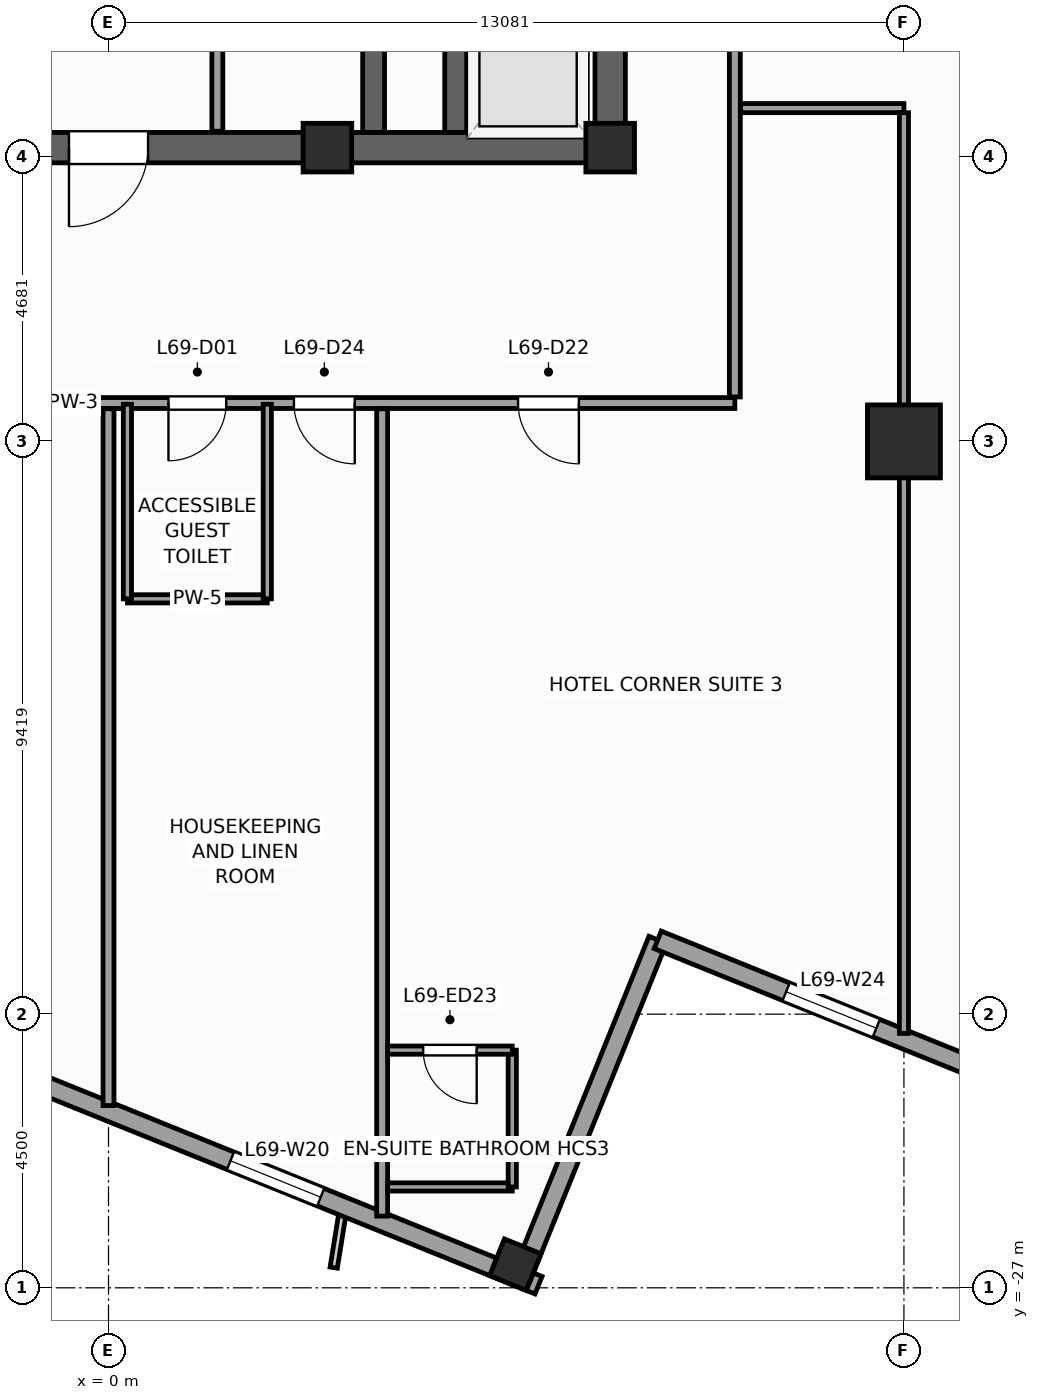
"""IFC4 building model, lengths in metres.
Left out: names, types, materials, properties, quantities, classifications, styles, units other than length and angle.
Written with IfcOpenShell. Run it as: python <this file> out.ifc"""

import sys

from ifc_helpers import new_model, si_unit, direction, frame, frame_2d, origin, origin_2d, place, context, subcontext, project, spatial, rectangle, extrude, source, transform, mapped, element, fill, save


model = new_model("IFC4")
c1 = context("Model", 3, precision=1e-05, world=origin(), true_north=direction((0.0, 1.0)))
c2 = subcontext(c1, "Body", "Model", "MODEL_VIEW")
j1 = project(units=[si_unit("LENGTHUNIT", "METRE"), si_unit("PLANEANGLEUNIT", "RADIAN")], contexts=[c1])
p1 = place(None, origin())
s1 = spatial("IfcSite", under=j1, at=p1, CompositionType="ELEMENT")
p2 = place(p1, origin())
s2 = spatial("IfcBuilding", under=s1, at=p2, CompositionType="ELEMENT")
p3 = place(p2, frame((0.0, 0.0, 283.2)))
s3 = spatial("IfcBuildingStorey", under=s2, at=p3, CompositionType="ELEMENT", Elevation=283.2)
p4 = place(p3, frame((-8.5, -8.25, 0.0), z_axis=(0.0, 0.0, 1.0), x_axis=(1.0, 0.0, 0.0)))
e1 = element("IfcWall", 1, at=p4, inside=s3, PredefinedType="SHEAR", context=c2, shape_type="SweptSolid", body=[
    extrude(rectangle(XDim=17.0, YDim=0.5, at=frame_2d((8.5, 0.0))), origin(), (0.0, 0.0, 1.0), 3.6),
])
p5 = place(p4, frame((7.85, 0.0, 0.0)))
e2 = element("IfcOpeningElement", 2, at=p5, cuts=e1, PredefinedType="OPENING", context=c2, shape_type="SweptSolid", body=[
    extrude(rectangle(XDim=1.3, YDim=2.2, at=frame_2d((0.65, 1.1))), frame((0.0, 0.26, 0.0), z_axis=(0.0, -1.0, 0.0), x_axis=(1.0, 0.0, 0.0)), (0.0, 0.0, 1.0), 0.52),
])
p6 = place(p3, frame((8.25, -8.0, 0.0), z_axis=(0.0, 0.0, 1.0), x_axis=(0.0, 1.0, 0.0)))
e3 = element("IfcWall", 3, at=p6, inside=s3, PredefinedType="SHEAR", context=c2, shape_type="SweptSolid", body=[
    extrude(rectangle(XDim=16.0, YDim=0.5, at=frame_2d((8.0, 0.0))), origin(), (0.0, 0.0, 1.0), 3.6),
])
p7 = place(p6, frame((4.69, 0.0, 0.0)))
e4 = element("IfcOpeningElement", 4, at=p7, cuts=e3, PredefinedType="OPENING", context=c2, shape_type="SweptSolid", body=[
    extrude(rectangle(XDim=1.3, YDim=2.2, at=frame_2d((0.65, 1.1))), frame((0.0, 0.26, 0.0), z_axis=(0.0, -1.0, 0.0), x_axis=(1.0, 0.0, 0.0)), (0.0, 0.0, 1.0), 0.52),
])
p8 = place(p3, frame((4.36, -8.0, 0.0), z_axis=(0.0, 0.0, 1.0), x_axis=(0.0, 1.0, 0.0)))
e5 = element("IfcWall", 5, at=p8, inside=s3, PredefinedType="SHEAR", context=c2, shape_type="SweptSolid", body=[
    extrude(rectangle(XDim=16.0, YDim=0.36, at=frame_2d((8.0, 0.0))), origin(), (0.0, 0.0, 1.0), 3.6),
])
p9 = place(p3, frame((5.71, -8.0, 0.0), z_axis=(0.0, 0.0, 1.0), x_axis=(0.0, 1.0, 0.0)))
e6 = element("IfcWall", 6, at=p9, inside=s3, PredefinedType="SHEAR", context=c2, shape_type="SweptSolid", body=[
    extrude(rectangle(XDim=2.54, YDim=0.36, at=frame_2d((1.27, 0.0))), origin(), (0.0, 0.0, 1.0), 3.6),
])
m1 = source(origin(), c2, "Body", "SweptSolid", [
    extrude(rectangle(XDim=0.8, YDim=0.8, at=origin_2d()), origin(), (0.0, 0.0, 1.0), 3.6),
])
for number, where, z_axis, x_axis in (
    (7, (8.25, -8.25, 0.0), (0.0, 0.0, 1.0), (1.0, 0.0, 0.0)),
    (8, (3.6, -8.25, 0.0), (0.0, 0.0, 1.0), (1.0, 0.0, 0.0)),
):
    element("IfcColumn", number, at=place(p3, frame(where, z_axis=z_axis, x_axis=x_axis)), inside=s3, PredefinedType="PILASTER", context=c2, shape_type="MappedRepresentation", body=[
        mapped(m1, transform((0.0, 0.0, 0.0), scale=1.0)),
    ])
m2 = source(origin(), c2, "Body", "SweptSolid", [
    extrude(rectangle(XDim=1.2, YDim=1.2, at=origin_2d()), origin(), (0.0, 0.0, 1.0), 3.6),
])
p10 = place(p3, frame((13.081, -13.081, 0.0), z_axis=(0.0, 0.0, 1.0), x_axis=(1.0, 0.0, 0.0)))
e9 = element("IfcColumn", 9, at=p10, inside=s3, PredefinedType="COLUMN", context=c2, shape_type="MappedRepresentation", body=[
    mapped(m2, transform((0.0, 0.0, 0.0), scale=1.0)),
])
m3 = source(origin(), c2, "Body", "SweptSolid", [
    extrude(rectangle(XDim=0.65, YDim=0.65, at=origin_2d()), origin(), (0.0, 0.0, 1.0), 3.6),
])
p11 = place(p3, frame((6.69, -26.62, 0.0), z_axis=(0.0, 0.0, 1.0), x_axis=(0.374606593416, 0.927183854567, 0.0)))
e10 = element("IfcColumn", 10, at=p11, inside=s3, PredefinedType="COLUMN", context=c2, shape_type="MappedRepresentation", body=[
    mapped(m3, transform((0.0, 0.0, 0.0), scale=1.0)),
])
p12 = place(p3, frame((-23.813, -14.479, 0.0), z_axis=(0.0, 0.0, 1.0), x_axis=(0.927182657188, -0.374609557019, 0.0)))
e11 = element("IfcWall", 11, at=p12, inside=s3, PredefinedType="STANDARD", context=c2, shape_type="SweptSolid", body=[
    extrude(rectangle(XDim=33.31, YDim=0.31, at=frame_2d((16.655, 0.0))), origin(), (0.0, 0.0, 1.0), 2.75),
])
p13 = place(p12, frame((3.197, 0.0, 0.47)))
e12 = element("IfcOpeningElement", 12, at=p13, cuts=e11, PredefinedType="OPENING", context=c2, shape_type="SweptSolid", body=[
    extrude(rectangle(XDim=1.6, YDim=2.1, at=frame_2d((0.8, 1.05))), frame((0.0, 0.165, 0.0), z_axis=(0.0, -1.0, 0.0), x_axis=(1.0, 0.0, 0.0)), (0.0, 0.0, 1.0), 0.33),
])
p14 = place(p12, frame((8.86, 0.0, 0.47)))
e13 = element("IfcOpeningElement", 13, at=p14, cuts=e11, PredefinedType="OPENING", context=c2, shape_type="SweptSolid", body=[
    extrude(rectangle(XDim=1.6, YDim=2.1, at=frame_2d((0.8, 1.05))), frame((0.0, 0.165, 0.0), z_axis=(0.0, -1.0, 0.0), x_axis=(1.0, 0.0, 0.0)), (0.0, 0.0, 1.0), 0.33),
])
p15 = place(p12, frame((14.439, 0.0, 0.47)))
e14 = element("IfcOpeningElement", 14, at=p15, cuts=e11, PredefinedType="OPENING", context=c2, shape_type="SweptSolid", body=[
    extrude(rectangle(XDim=1.6, YDim=2.1, at=frame_2d((0.8, 1.05))), frame((0.0, 0.165, 0.0), z_axis=(0.0, -1.0, 0.0), x_axis=(1.0, 0.0, 0.0)), (0.0, 0.0, 1.0), 0.33),
])
p16 = place(p12, frame((21.851, 0.0, 0.47)))
e15 = element("IfcOpeningElement", 15, at=p16, cuts=e11, PredefinedType="OPENING", context=c2, shape_type="SweptSolid", body=[
    extrude(rectangle(XDim=1.6, YDim=2.1, at=frame_2d((0.8, 1.05))), frame((0.0, 0.165, 0.0), z_axis=(0.0, -1.0, 0.0), x_axis=(1.0, 0.0, 0.0)), (0.0, 0.0, 1.0), 0.33),
])
p17 = place(p12, frame((27.847, 0.0, 0.47)))
e16 = element("IfcOpeningElement", 16, at=p17, cuts=e11, PredefinedType="OPENING", context=c2, shape_type="SweptSolid", body=[
    extrude(rectangle(XDim=1.6, YDim=2.1, at=frame_2d((0.8, 1.05))), frame((0.0, 0.165, 0.0), z_axis=(0.0, -1.0, 0.0), x_axis=(1.0, 0.0, 0.0)), (0.0, 0.0, 1.0), 0.33),
])
p18 = place(p3, frame((6.784, -26.841, 0.0), z_axis=(0.0, 0.0, 1.0), x_axis=(0.374636620962, 0.927171722085, 0.0)))
e17 = element("IfcWall", 17, at=p18, inside=s3, PredefinedType="STANDARD", context=c2, shape_type="SweptSolid", body=[
    extrude(rectangle(XDim=6.0, YDim=0.31, at=frame_2d((3.0, 0.0))), origin(), (0.0, 0.0, 1.0), 2.65),
])
p19 = place(p3, frame((9.032, -21.278, 0.0), z_axis=(0.0, 0.0, 1.0), x_axis=(0.927185411764, -0.374602739196, 0.0)))
e18 = element("IfcWall", 18, at=p19, inside=s3, PredefinedType="STANDARD", context=c2, shape_type="SweptSolid", body=[
    extrude(rectangle(XDim=6.155, YDim=0.31, at=frame_2d((3.078, 0.0))), origin(), (0.0, 0.0, 1.0), 3.35),
])
p20 = place(p19, frame((2.278, 0.0, 0.47)))
e19 = element("IfcOpeningElement", 19, at=p20, cuts=e18, PredefinedType="OPENING", context=c2, shape_type="SweptSolid", body=[
    extrude(rectangle(XDim=1.6, YDim=2.1, at=frame_2d((0.8, 1.05))), frame((0.0, 0.165, 0.0), z_axis=(0.0, -1.0, 0.0), x_axis=(1.0, 0.0, 0.0)), (0.0, 0.0, 1.0), 0.33),
])
p21 = place(p3, frame((1.79, -7.98, 0.0), z_axis=(0.0, 0.0, 1.0), x_axis=(0.0, 1.0, 0.0)))
e20 = element("IfcWall", 20, at=p21, inside=s3, PredefinedType="PARTITIONING", context=c2, shape_type="SweptSolid", body=[
    extrude(rectangle(XDim=12.38, YDim=0.18, at=frame_2d((6.19, 0.0))), origin(), (0.0, 0.0, 1.0), 3.35),
])
p22 = place(p21, frame((8.8, 0.0, 0.0)))
e21 = element("IfcOpeningElement", 21, at=p22, cuts=e20, PredefinedType="OPENING", context=c2, shape_type="SweptSolid", body=[
    extrude(rectangle(XDim=1.1, YDim=2.2, at=frame_2d((0.55, 1.1))), frame((0.0, 0.1, 0.0), z_axis=(0.0, -1.0, 0.0), x_axis=(1.0, 0.0, 0.0)), (0.0, 0.0, 1.0), 0.2),
])
p23 = place(p21, frame((10.86, 0.0, 0.0)))
e22 = element("IfcOpeningElement", 22, at=p23, cuts=e20, PredefinedType="OPENING", context=c2, shape_type="SweptSolid", body=[
    extrude(rectangle(XDim=1.1, YDim=2.2, at=frame_2d((0.55, 1.1))), frame((0.0, 0.1, 0.0), z_axis=(0.0, -1.0, 0.0), x_axis=(1.0, 0.0, 0.0)), (0.0, 0.0, 1.0), 0.2),
])
p24 = place(p21, frame((3.5, 0.0, 0.0)))
e23 = element("IfcOpeningElement", 23, at=p24, cuts=e20, PredefinedType="OPENING", context=c2, shape_type="SweptSolid", body=[
    extrude(rectangle(XDim=1.15, YDim=2.25, at=frame_2d((0.575, 1.125))), frame((0.0, 0.1, 0.0), z_axis=(0.0, -1.0, 0.0), x_axis=(1.0, 0.0, 0.0)), (0.0, 0.0, 1.0), 0.2),
])
p25 = place(p3, frame((-11.45, -12.45, 0.0), z_axis=(0.0, 0.0, 1.0), x_axis=(1.0, 0.0, 0.0)))
e24 = element("IfcWall", 24, at=p25, inside=s3, PredefinedType="PARTITIONING", context=c2, shape_type="SweptSolid", body=[
    extrude(rectangle(XDim=21.75, YDim=0.18, at=frame_2d((10.875, 0.0))), origin(), (0.0, 0.0, 1.0), 3.35),
])
p26 = place(p25, frame((12.436, 0.0, 0.0)))
e25 = element("IfcOpeningElement", 25, at=p26, cuts=e24, PredefinedType="OPENING", context=c2, shape_type="SweptSolid", body=[
    extrude(rectangle(XDim=0.95, YDim=2.1, at=frame_2d((0.475, 1.05))), frame((0.0, 0.1, 0.0), z_axis=(0.0, -1.0, 0.0), x_axis=(1.0, 0.0, 0.0)), (0.0, 0.0, 1.0), 0.2),
])
p27 = place(p25, frame((18.186, 0.0, 0.0)))
e26 = element("IfcOpeningElement", 26, at=p27, cuts=e24, PredefinedType="OPENING", context=c2, shape_type="SweptSolid", body=[
    extrude(rectangle(XDim=1.0, YDim=2.15, at=frame_2d((0.5, 1.075))), frame((0.0, 0.1, 0.0), z_axis=(0.0, -1.0, 0.0), x_axis=(1.0, 0.0, 0.0)), (0.0, 0.0, 1.0), 0.2),
])
p28 = place(p25, frame((14.5, 0.0, 0.0)))
e27 = element("IfcOpeningElement", 27, at=p28, cuts=e24, PredefinedType="OPENING", context=c2, shape_type="SweptSolid", body=[
    extrude(rectangle(XDim=1.0, YDim=2.15, at=frame_2d((0.5, 1.075))), frame((0.0, 0.1, 0.0), z_axis=(0.0, -1.0, 0.0), x_axis=(1.0, 0.0, 0.0)), (0.0, 0.0, 1.0), 0.2),
])
p29 = place(p25, frame((8.7, 0.0, 0.0)))
e28 = element("IfcOpeningElement", 28, at=p29, cuts=e24, PredefinedType="OPENING", context=c2, shape_type="SweptSolid", body=[
    extrude(rectangle(XDim=1.0, YDim=2.15, at=frame_2d((0.5, 1.075))), frame((0.0, 0.1, 0.0), z_axis=(0.0, -1.0, 0.0), x_axis=(1.0, 0.0, 0.0)), (0.0, 0.0, 1.0), 0.2),
])
p30 = place(p25, frame((3.139, 0.0, 0.0)))
e29 = element("IfcOpeningElement", 29, at=p30, cuts=e24, PredefinedType="OPENING", context=c2, shape_type="SweptSolid", body=[
    extrude(rectangle(XDim=1.0, YDim=2.15, at=frame_2d((0.5, 1.075))), frame((0.0, 0.1, 0.0), z_axis=(0.0, -1.0, 0.0), x_axis=(1.0, 0.0, 0.0)), (0.0, 0.0, 1.0), 0.2),
])
p31 = place(p3, frame((10.3, -12.35, 0.0), z_axis=(0.0, 0.0, 1.0), x_axis=(0.0, 1.0, 0.0)))
e30 = element("IfcWall", 30, at=p31, inside=s3, PredefinedType="PARTITIONING", context=c2, shape_type="SweptSolid", body=[
    extrude(rectangle(XDim=23.7, YDim=0.18, at=frame_2d((11.85, 0.0))), origin(), (0.0, 0.0, 1.0), 3.35),
])
p32 = place(p31, frame((17.65, 0.0, 0.0)))
e31 = element("IfcOpeningElement", 31, at=p32, cuts=e30, PredefinedType="OPENING", context=c2, shape_type="SweptSolid", body=[
    extrude(rectangle(XDim=1.0, YDim=2.15, at=frame_2d((0.5, 1.075))), frame((0.0, 0.1, 0.0), z_axis=(0.0, -1.0, 0.0), x_axis=(1.0, 0.0, 0.0)), (0.0, 0.0, 1.0), 0.2),
])
p33 = place(p31, frame((13.85, 0.0, 0.0)))
e32 = element("IfcOpeningElement", 32, at=p33, cuts=e30, PredefinedType="OPENING", context=c2, shape_type="SweptSolid", body=[
    extrude(rectangle(XDim=1.0, YDim=2.15, at=frame_2d((0.5, 1.075))), frame((0.0, 0.1, 0.0), z_axis=(0.0, -1.0, 0.0), x_axis=(1.0, 0.0, 0.0)), (0.0, 0.0, 1.0), 0.2),
])
p34 = place(p31, frame((9.85, 0.0, 0.0)))
e33 = element("IfcOpeningElement", 33, at=p34, cuts=e30, PredefinedType="OPENING", context=c2, shape_type="SweptSolid", body=[
    extrude(rectangle(XDim=1.0, YDim=2.15, at=frame_2d((0.5, 1.075))), frame((0.0, 0.1, 0.0), z_axis=(0.0, -1.0, 0.0), x_axis=(1.0, 0.0, 0.0)), (0.0, 0.0, 1.0), 0.2),
])
p35 = place(p31, frame((6.05, 0.0, 0.0)))
e34 = element("IfcOpeningElement", 34, at=p35, cuts=e30, PredefinedType="OPENING", context=c2, shape_type="SweptSolid", body=[
    extrude(rectangle(XDim=1.0, YDim=2.15, at=frame_2d((0.5, 1.075))), frame((0.0, 0.1, 0.0), z_axis=(0.0, -1.0, 0.0), x_axis=(1.0, 0.0, 0.0)), (0.0, 0.0, 1.0), 0.2),
])
p36 = place(p3, frame((4.5, -12.545, 0.0), z_axis=(0.0, 0.0, 1.0), x_axis=(0.0, -1.0, 0.0)))
e35 = element("IfcWall", 35, at=p36, inside=s3, PredefinedType="PARTITIONING", context=c2, shape_type="SweptSolid", body=[
    extrude(rectangle(XDim=13.276, YDim=0.18, at=frame_2d((6.638, 0.0))), origin(), (0.0, 0.0, 1.0), 3.35),
])
p37 = place(p3, frame((0.0, -12.545, 0.0), z_axis=(0.0, 0.0, 1.0), x_axis=(0.0, -1.0, 0.0)))
e36 = element("IfcWall", 36, at=p37, inside=s3, PredefinedType="PARTITIONING", context=c2, shape_type="SweptSolid", body=[
    extrude(rectangle(XDim=11.458, YDim=0.18, at=frame_2d((5.729, 0.0))), origin(), (0.0, 0.0, 1.0), 3.02),
])
p38 = place(p3, frame((10.395, -7.6, 0.0), z_axis=(0.0, 0.0, 1.0), x_axis=(1.0, 0.0, 0.0)))
e37 = element("IfcWall", 37, at=p38, inside=s3, PredefinedType="PARTITIONING", context=c2, shape_type="SweptSolid", body=[
    extrude(rectangle(XDim=2.686, YDim=0.15, at=frame_2d((1.343, 0.0))), origin(), (0.0, 0.0, 1.0), 3.35),
])
p39 = place(p3, frame((13.081, -7.675, 0.0), z_axis=(0.0, 0.0, 1.0), x_axis=(0.0, -1.0, 0.0)))
e38 = element("IfcWall", 38, at=p39, inside=s3, PredefinedType="PARTITIONING", context=c2, shape_type="SweptSolid", body=[
    extrude(rectangle(XDim=15.142, YDim=0.15, at=frame_2d((7.571, 0.0))), origin(), (0.0, 0.0, 1.0), 2.45),
])
p40 = place(p3, frame((0.311, -15.67, 0.0), z_axis=(0.0, 0.0, 1.0), x_axis=(1.0, 0.0, 0.0)))
e39 = element("IfcWall", 39, at=p40, inside=s3, PredefinedType="PARTITIONING", context=c2, shape_type="SweptSolid", body=[
    extrude(rectangle(XDim=2.3, YDim=0.135, at=frame_2d((1.15, 0.0))), origin(), (0.0, 0.0, 1.0), 3.35),
])
p41 = place(p3, frame((2.611, -15.67, 0.0), z_axis=(0.0, 0.0, 1.0), x_axis=(0.0, 1.0, 0.0)))
e40 = element("IfcWall", 40, at=p41, inside=s3, PredefinedType="PARTITIONING", context=c2, shape_type="SweptSolid", body=[
    extrude(rectangle(XDim=3.2, YDim=0.135, at=frame_2d((1.6, 0.0))), origin(), (0.0, 0.0, 1.0), 3.02),
])
p42 = place(p3, frame((0.311, -15.67, 0.0), z_axis=(0.0, 0.0, 1.0), x_axis=(0.0, 1.0, 0.0)))
e41 = element("IfcWall", 41, at=p42, inside=s3, PredefinedType="PARTITIONING", context=c2, shape_type="SweptSolid", body=[
    extrude(rectangle(XDim=3.2, YDim=0.135, at=frame_2d((1.6, 0.0))), origin(), (0.0, 0.0, 1.0), 3.35),
])
p43 = place(p3, frame((4.59, -25.342, 0.0), z_axis=(0.0, 0.0, 1.0), x_axis=(1.0, 0.0, 0.0)))
e42 = element("IfcWall", 42, at=p43, inside=s3, PredefinedType="PARTITIONING", context=c2, shape_type="SweptSolid", body=[
    extrude(rectangle(XDim=2.05, YDim=0.135, at=frame_2d((1.025, 0.0))), origin(), (0.0, 0.0, 1.0), 3.35),
])
p44 = place(p3, frame((6.64, -25.342, 0.0), z_axis=(0.0, 0.0, 1.0), x_axis=(0.0, 1.0, 0.0)))
e43 = element("IfcWall", 43, at=p44, inside=s3, PredefinedType="PARTITIONING", context=c2, shape_type="SweptSolid", body=[
    extrude(rectangle(XDim=2.25, YDim=0.135, at=frame_2d((1.125, 0.0))), origin(), (0.0, 0.0, 1.0), 3.35),
])
p45 = place(p3, frame((4.59, -23.092, 0.0), z_axis=(0.0, 0.0, 1.0), x_axis=(1.0, 0.0, 0.0)))
e44 = element("IfcWall", 44, at=p45, inside=s3, PredefinedType="PARTITIONING", context=c2, shape_type="SweptSolid", body=[
    extrude(rectangle(XDim=2.05, YDim=0.135, at=frame_2d((1.025, 0.0))), origin(), (0.0, 0.0, 1.0), 3.35),
])
p46 = place(p45, frame((0.585, 0.0, 0.0)))
e45 = element("IfcOpeningElement", 45, at=p46, cuts=e44, PredefinedType="OPENING", context=c2, shape_type="SweptSolid", body=[
    extrude(rectangle(XDim=0.88, YDim=2.1, at=frame_2d((0.44, 1.05))), frame((0.0, 0.078, 0.0), z_axis=(0.0, -1.0, 0.0), x_axis=(1.0, 0.0, 0.0)), (0.0, 0.0, 1.0), 0.155),
])
m4 = source(origin(), c2, "Body", "SweptSolid", [
    extrude(rectangle(XDim=1.6, YDim=2.1, at=frame_2d((0.8, 1.05))), frame((0.0, 0.03, 0.0), z_axis=(0.0, -1.0, 0.0), x_axis=(1.0, 0.0, 0.0)), (0.0, 0.0, 1.0), 0.06),
])
p47 = place(p17, origin())
e46 = element("IfcWindow", 46, at=p47, inside=s3, PartitioningType="SINGLE_PANEL", PredefinedType="WINDOW", context=c2, shape_type="MappedRepresentation", body=[
    mapped(m4, transform((0.0, 0.0, 0.0), scale=1.0)),
])
fill(e16, e46)
p48 = place(p20, origin())
e47 = element("IfcWindow", 47, at=p48, inside=s3, PartitioningType="SINGLE_PANEL", PredefinedType="WINDOW", context=c2, shape_type="MappedRepresentation", body=[
    mapped(m4, transform((0.0, 0.0, 0.0), scale=1.0)),
])
fill(e19, e47)
m5 = source(origin(), c2, "Body", "SweptSolid", [
    extrude(rectangle(XDim=1.3, YDim=2.2, at=frame_2d((0.65, 1.1))), frame((0.0, 0.025, 0.0), z_axis=(0.0, -1.0, 0.0), x_axis=(1.0, 0.0, 0.0)), (0.0, 0.0, 1.0), 0.05),
])
p49 = place(p5, frame((1.3, 0.0, 0.0), z_axis=(0.0, 0.0, 1.0), x_axis=(-1.0, 0.0, 0.0)))
e48 = element("IfcDoor", 48, at=p49, inside=s3, OperationType="SINGLE_SWING_LEFT", PredefinedType="DOOR", context=c2, shape_type="MappedRepresentation", body=[
    mapped(m5, transform((0.0, 0.0, 0.0), scale=1.0)),
])
fill(e2, e48)
m6 = source(origin(), c2, "Body", "SweptSolid", [
    extrude(rectangle(XDim=0.95, YDim=2.1, at=frame_2d((0.475, 1.05))), frame((0.0, 0.025, 0.0), z_axis=(0.0, -1.0, 0.0), x_axis=(1.0, 0.0, 0.0)), (0.0, 0.0, 1.0), 0.05),
])
p50 = place(p26, frame((0.95, 0.0, 0.0), z_axis=(0.0, 0.0, 1.0), x_axis=(-1.0, 0.0, 0.0)))
e49 = element("IfcDoor", 49, at=p50, inside=s3, OperationType="SINGLE_SWING_LEFT", PredefinedType="DOOR", context=c2, shape_type="MappedRepresentation", body=[
    mapped(m6, transform((0.0, 0.0, 0.0), scale=1.0)),
])
fill(e25, e49)
m7 = source(origin(), c2, "Body", "SweptSolid", [
    extrude(rectangle(XDim=1.0, YDim=2.15, at=frame_2d((0.5, 1.075))), frame((0.0, 0.025, 0.0), z_axis=(0.0, -1.0, 0.0), x_axis=(1.0, 0.0, 0.0)), (0.0, 0.0, 1.0), 0.05),
])
p51 = place(p27, frame((1.0, 0.0, 0.0), z_axis=(0.0, 0.0, 1.0), x_axis=(-1.0, 0.0, 0.0)))
e50 = element("IfcDoor", 50, at=p51, inside=s3, OperationType="SINGLE_SWING_RIGHT", PredefinedType="DOOR", context=c2, shape_type="MappedRepresentation", body=[
    mapped(m7, transform((0.0, 0.0, 0.0), scale=1.0)),
])
fill(e26, e50)
m8 = source(origin(), c2, "Body", "SweptSolid", [
    extrude(rectangle(XDim=0.88, YDim=2.1, at=frame_2d((0.44, 1.05))), frame((0.0, 0.025, 0.0), z_axis=(0.0, -1.0, 0.0), x_axis=(1.0, 0.0, 0.0)), (0.0, 0.0, 1.0), 0.05),
])
p52 = place(p46, frame((0.88, 0.0, 0.0), z_axis=(0.0, 0.0, 1.0), x_axis=(-1.0, 0.0, 0.0)))
e51 = element("IfcDoor", 51, at=p52, inside=s3, OperationType="SINGLE_SWING_RIGHT", PredefinedType="DOOR", context=c2, shape_type="MappedRepresentation", body=[
    mapped(m8, transform((0.0, 0.0, 0.0), scale=1.0)),
])
fill(e45, e51)
p53 = place(p28, frame((1.0, 0.0, 0.0), z_axis=(0.0, 0.0, 1.0), x_axis=(-1.0, 0.0, 0.0)))
e52 = element("IfcDoor", 52, at=p53, inside=s3, OperationType="SINGLE_SWING_RIGHT", PredefinedType="DOOR", context=c2, shape_type="MappedRepresentation", body=[
    mapped(m7, transform((0.0, 0.0, 0.0), scale=1.0)),
])
fill(e27, e52)
save(model, sys.argv[1])
